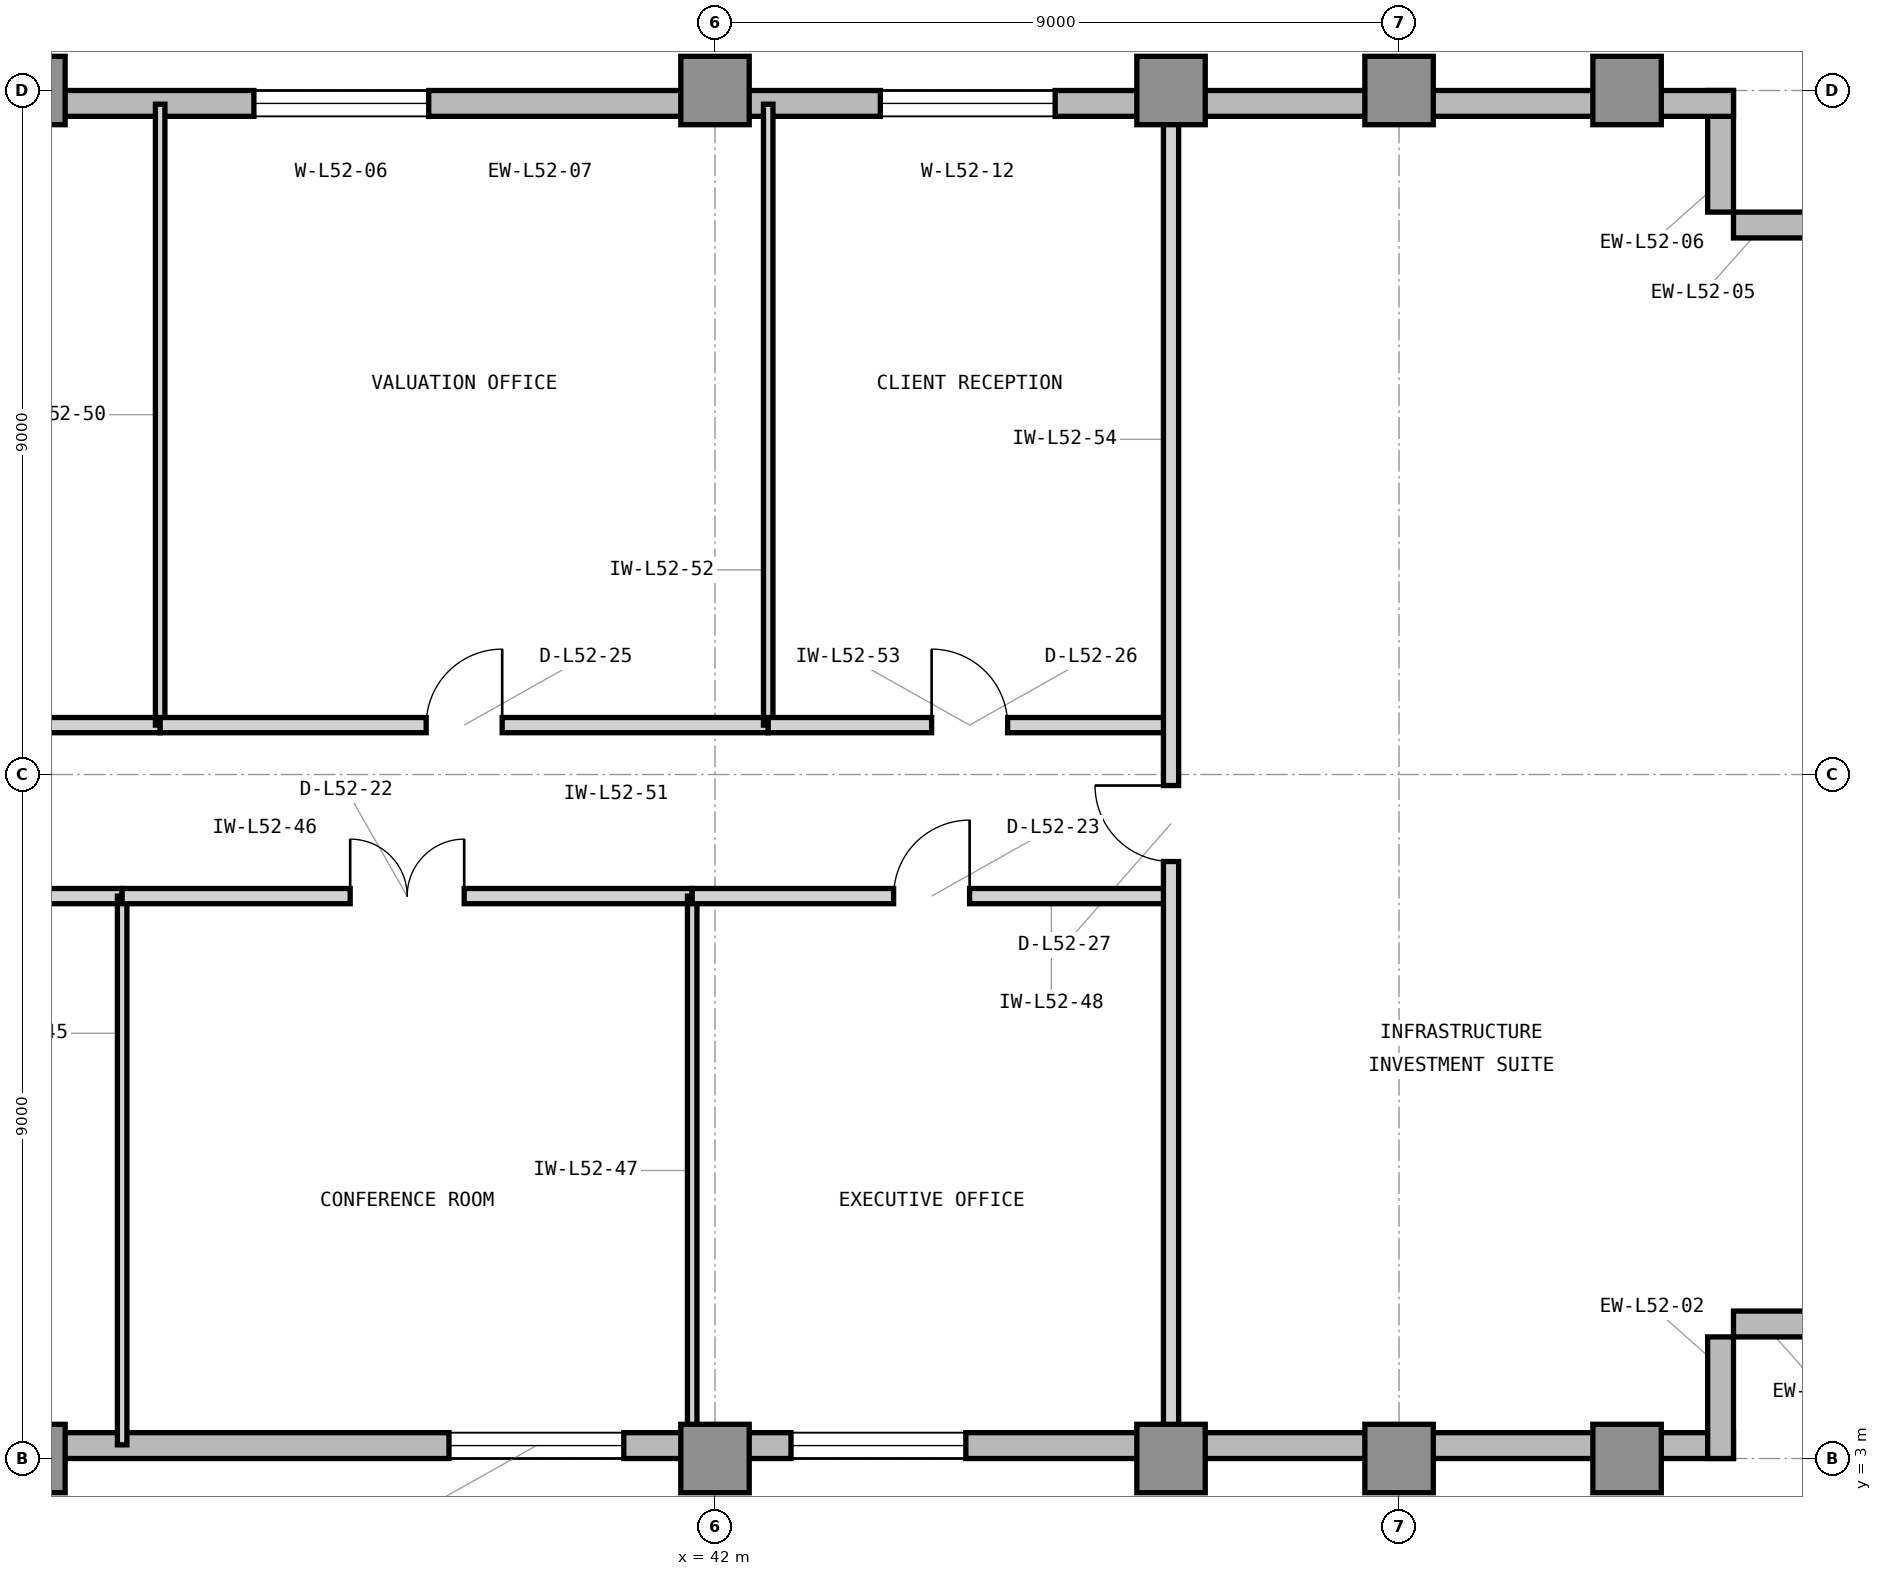
"""IFC4 building model, lengths in metres.
Left out: names, types, materials, properties, quantities, classifications, styles, units other than length and angle.
Written with IfcOpenShell. Run it as: python <this file> out.ifc"""

import sys

from ifc_helpers import new_model, si_unit, direction, frame, frame_2d, origin, origin_2d, place, context, subcontext, project, spatial, rectangle, extrude, element, fill, save


model = new_model("IFC4")
c1 = context("Model", 3, precision=1e-05, world=origin(), true_north=direction((0.0, 1.0)))
c2 = subcontext(c1, "Body", "Model", "MODEL_VIEW")
j1 = project(units=[si_unit("LENGTHUNIT", "METRE"), si_unit("PLANEANGLEUNIT", "RADIAN")], contexts=[c1])
p1 = place(None, origin())
s1 = spatial("IfcSite", under=j1, at=p1, CompositionType="ELEMENT")
p2 = place(p1, origin())
s2 = spatial("IfcBuilding", under=s1, at=p2, CompositionType="ELEMENT")
p3 = place(p2, frame((0.0, 0.0, 215.1)))
s3 = spatial("IfcBuildingStorey", under=s2, at=p3, CompositionType="ELEMENT", Elevation=215.1)
for number, where, z_axis, x_axis in (
    (1, (33.0, 3.0, 0.0), (0.0, 0.0, 1.0), (1.0, 0.0, 0.0)),
    (2, (33.0, 21.0, 0.0), (0.0, 0.0, 1.0), (1.0, 0.0, 0.0)),
    (3, (42.0, 3.0, 0.0), (0.0, 0.0, 1.0), (1.0, 0.0, 0.0)),
    (4, (42.0, 21.0, 0.0), (0.0, 0.0, 1.0), (1.0, 0.0, 0.0)),
    (5, (48.0, 3.0, 0.0), (0.0, 0.0, 1.0), (1.0, 0.0, 0.0)),
    (6, (48.0, 21.0, 0.0), (0.0, 0.0, 1.0), (1.0, 0.0, 0.0)),
    (7, (51.0, 3.0, 0.0), (0.0, 0.0, 1.0), (1.0, 0.0, 0.0)),
    (8, (51.0, 21.0, 0.0), (0.0, 0.0, 1.0), (1.0, 0.0, 0.0)),
    (9, (54.0, 3.0, 0.0), (0.0, 0.0, 1.0), (1.0, 0.0, 0.0)),
    (10, (54.0, 21.0, 0.0), (0.0, 0.0, 1.0), (1.0, 0.0, 0.0)),
):
    element("IfcColumn", number, at=place(p3, frame(where, z_axis=z_axis, x_axis=x_axis)), inside=s3, PredefinedType="COLUMN", context=c2, shape_type="SweptSolid", body=[
        extrude(rectangle(XDim=0.9, YDim=0.9, at=origin_2d()), origin(), (0.0, 0.0, 1.0), 3.9),
    ])
p4 = place(p3, frame((23.9, 3.17, 0.0), z_axis=(0.0, 0.0, 1.0), x_axis=(1.0, 0.0, 0.0)))
e11 = element("IfcWall", 11, at=p4, inside=s3, PredefinedType="STANDARD", context=c2, shape_type="SweptSolid", body=[
    extrude(rectangle(XDim=31.5, YDim=0.34, at=frame_2d((15.75, 0.0))), origin(), (0.0, 0.0, 1.0), 3.7),
])
p5 = place(p4, frame((5.6, 0.0, 0.9)))
e12 = element("IfcOpeningElement", 12, at=p5, cuts=e11, PredefinedType="OPENING", context=c2, shape_type="SweptSolid", body=[
    extrude(rectangle(XDim=2.3, YDim=2.2, at=frame_2d((1.15, 1.1))), frame((0.0, 0.18, 0.0), z_axis=(0.0, -1.0, 0.0), x_axis=(1.0, 0.0, 0.0)), (0.0, 0.0, 1.0), 0.36),
])
p6 = place(p4, frame((14.6, 0.0, 0.9)))
e13 = element("IfcOpeningElement", 13, at=p6, cuts=e11, PredefinedType="OPENING", context=c2, shape_type="SweptSolid", body=[
    extrude(rectangle(XDim=2.3, YDim=2.2, at=frame_2d((1.15, 1.1))), frame((0.0, 0.18, 0.0), z_axis=(0.0, -1.0, 0.0), x_axis=(1.0, 0.0, 0.0)), (0.0, 0.0, 1.0), 0.36),
])
p7 = place(p4, frame((19.1, 0.0, 0.9)))
e14 = element("IfcOpeningElement", 14, at=p7, cuts=e11, PredefinedType="OPENING", context=c2, shape_type="SweptSolid", body=[
    extrude(rectangle(XDim=2.3, YDim=2.2, at=frame_2d((1.15, 1.1))), frame((0.0, 0.18, 0.0), z_axis=(0.0, -1.0, 0.0), x_axis=(1.0, 0.0, 0.0)), (0.0, 0.0, 1.0), 0.36),
])
p8 = place(p4, frame((0.9, 0.0, 0.9)))
e15 = element("IfcOpeningElement", 15, at=p8, cuts=e11, PredefinedType="OPENING", context=c2, shape_type="SweptSolid", body=[
    extrude(rectangle(XDim=1.6, YDim=2.2, at=frame_2d((0.8, 1.1))), frame((0.0, 0.18, 0.0), z_axis=(0.0, -1.0, 0.0), x_axis=(1.0, 0.0, 0.0)), (0.0, 0.0, 1.0), 0.36),
])
for number, where, z_axis, x_axis in (
    (16, (55.23, 3.0, 0.0), (0.0, 0.0, 1.0), (0.0, 1.0, 0.0)),
    (17, (55.4, 4.77, 0.0), (0.0, 0.0, 1.0), (1.0, 0.0, 0.0)),
    (18, (57.0, 19.23, 0.0), (0.0, 0.0, 1.0), (-1.0, 0.0, 0.0)),
    (19, (55.23, 19.4, 0.0), (0.0, 0.0, 1.0), (0.0, 1.0, 0.0)),
):
    element("IfcWall", number, at=place(p3, frame(where, z_axis=z_axis, x_axis=x_axis)), inside=s3, PredefinedType="STANDARD", context=c2, shape_type="SweptSolid", body=[
        extrude(rectangle(XDim=1.6, YDim=0.34, at=frame_2d((0.8, 0.0))), origin(), (0.0, 0.0, 1.0), 3.7),
    ])
p9 = place(p3, frame((55.4, 20.83, 0.0), z_axis=(0.0, 0.0, 1.0), x_axis=(-1.0, 0.0, 0.0)))
e20 = element("IfcWall", 20, at=p9, inside=s3, PredefinedType="STANDARD", context=c2, shape_type="SweptSolid", body=[
    extrude(rectangle(XDim=31.4, YDim=0.34, at=frame_2d((15.7, 0.0))), origin(), (0.0, 0.0, 1.0), 3.7),
])
p10 = place(p9, frame((17.167, 0.0, 0.9)))
e21 = element("IfcOpeningElement", 21, at=p10, cuts=e20, PredefinedType="OPENING", context=c2, shape_type="SweptSolid", body=[
    extrude(rectangle(XDim=2.3, YDim=2.2, at=frame_2d((1.15, 1.1))), frame((0.0, 0.18, 0.0), z_axis=(0.0, -1.0, 0.0), x_axis=(1.0, 0.0, 0.0)), (0.0, 0.0, 1.0), 0.36),
])
p11 = place(p9, frame((29.046, 0.0, 0.9)))
e22 = element("IfcOpeningElement", 22, at=p11, cuts=e20, PredefinedType="OPENING", context=c2, shape_type="SweptSolid", body=[
    extrude(rectangle(XDim=1.6, YDim=2.2, at=frame_2d((0.8, 1.1))), frame((0.0, 0.18, 0.0), z_axis=(0.0, -1.0, 0.0), x_axis=(1.0, 0.0, 0.0)), (0.0, 0.0, 1.0), 0.36),
])
p12 = place(p9, frame((8.925, 0.0, 0.9)))
e23 = element("IfcOpeningElement", 23, at=p12, cuts=e20, PredefinedType="OPENING", context=c2, shape_type="SweptSolid", body=[
    extrude(rectangle(XDim=2.3, YDim=2.2, at=frame_2d((1.15, 1.1))), frame((0.0, 0.18, 0.0), z_axis=(0.0, -1.0, 0.0), x_axis=(1.0, 0.0, 0.0)), (0.0, 0.0, 1.0), 0.36),
])
p13 = place(p3, frame((26.7, 10.4, 0.0), z_axis=(0.0, 0.0, 1.0), x_axis=(1.0, 0.0, 0.0)))
e24 = element("IfcWall", 24, at=p13, inside=s3, PredefinedType="PARTITIONING", context=c2, shape_type="SweptSolid", body=[
    extrude(rectangle(XDim=7.5, YDim=0.2, at=frame_2d((3.75, 0.0))), origin(), (0.0, 0.0, 1.0), 3.69),
])
p14 = place(p13, frame((3.25, 0.0, 0.0)))
e25 = element("IfcOpeningElement", 25, at=p14, cuts=e24, PredefinedType="OPENING", context=c2, shape_type="SweptSolid", body=[
    extrude(rectangle(XDim=1.0, YDim=2.15, at=frame_2d((0.5, 1.075))), frame((0.0, 0.11, 0.0), z_axis=(0.0, -1.0, 0.0), x_axis=(1.0, 0.0, 0.0)), (0.0, 0.0, 1.0), 0.22),
])
p15 = place(p3, frame((34.2, 3.18, 0.0), z_axis=(0.0, 0.0, 1.0), x_axis=(0.0, 1.0, 0.0)))
e26 = element("IfcWall", 26, at=p15, inside=s3, PredefinedType="PARTITIONING", context=c2, shape_type="SweptSolid", body=[
    extrude(rectangle(XDim=7.22, YDim=0.125, at=frame_2d((3.61, 0.0))), origin(), (0.0, 0.0, 1.0), 3.69),
])
p16 = place(p3, frame((34.2, 10.4, 0.0), z_axis=(0.0, 0.0, 1.0), x_axis=(1.0, 0.0, 0.0)))
e27 = element("IfcWall", 27, at=p16, inside=s3, PredefinedType="PARTITIONING", context=c2, shape_type="SweptSolid", body=[
    extrude(rectangle(XDim=7.5, YDim=0.2, at=frame_2d((3.75, 0.0))), origin(), (0.0, 0.0, 1.0), 3.69),
])
p17 = place(p16, frame((3.0, 0.0, 0.0)))
e28 = element("IfcOpeningElement", 28, at=p17, cuts=e27, PredefinedType="OPENING", context=c2, shape_type="SweptSolid", body=[
    extrude(rectangle(XDim=1.5, YDim=2.3, at=frame_2d((0.75, 1.15))), frame((0.0, 0.11, 0.0), z_axis=(0.0, -1.0, 0.0), x_axis=(1.0, 0.0, 0.0)), (0.0, 0.0, 1.0), 0.22),
])
p18 = place(p3, frame((41.7, 3.18, 0.0), z_axis=(0.0, 0.0, 1.0), x_axis=(0.0, 1.0, 0.0)))
e29 = element("IfcWall", 29, at=p18, inside=s3, PredefinedType="PARTITIONING", context=c2, shape_type="SweptSolid", body=[
    extrude(rectangle(XDim=7.22, YDim=0.125, at=frame_2d((3.61, 0.0))), origin(), (0.0, 0.0, 1.0), 3.69),
])
p19 = place(p3, frame((41.7, 10.4, 0.0), z_axis=(0.0, 0.0, 1.0), x_axis=(1.0, 0.0, 0.0)))
e30 = element("IfcWall", 30, at=p19, inside=s3, PredefinedType="PARTITIONING", context=c2, shape_type="SweptSolid", body=[
    extrude(rectangle(XDim=6.3, YDim=0.2, at=frame_2d((3.15, 0.0))), origin(), (0.0, 0.0, 1.0), 3.69),
])
p20 = place(p19, frame((2.65, 0.0, 0.0)))
e31 = element("IfcOpeningElement", 31, at=p20, cuts=e30, PredefinedType="OPENING", context=c2, shape_type="SweptSolid", body=[
    extrude(rectangle(XDim=1.0, YDim=2.15, at=frame_2d((0.5, 1.075))), frame((0.0, 0.11, 0.0), z_axis=(0.0, -1.0, 0.0), x_axis=(1.0, 0.0, 0.0)), (0.0, 0.0, 1.0), 0.22),
])
p21 = place(p3, frame((26.7, 12.65, 0.0), z_axis=(0.0, 0.0, 1.0), x_axis=(1.0, 0.0, 0.0)))
e32 = element("IfcWall", 32, at=p21, inside=s3, PredefinedType="PARTITIONING", context=c2, shape_type="SweptSolid", body=[
    extrude(rectangle(XDim=8.0, YDim=0.2, at=frame_2d((4.0, 0.0))), origin(), (0.0, 0.0, 1.0), 3.69),
])
p22 = place(p21, frame((3.5, 0.0, 0.0)))
e33 = element("IfcOpeningElement", 33, at=p22, cuts=e32, PredefinedType="OPENING", context=c2, shape_type="SweptSolid", body=[
    extrude(rectangle(XDim=1.0, YDim=2.15, at=frame_2d((0.5, 1.075))), frame((0.0, 0.11, 0.0), z_axis=(0.0, -1.0, 0.0), x_axis=(1.0, 0.0, 0.0)), (0.0, 0.0, 1.0), 0.22),
])
p23 = place(p3, frame((34.7, 12.65, 0.0), z_axis=(0.0, 0.0, 1.0), x_axis=(0.0, 1.0, 0.0)))
e34 = element("IfcWall", 34, at=p23, inside=s3, PredefinedType="PARTITIONING", context=c2, shape_type="SweptSolid", body=[
    extrude(rectangle(XDim=8.17, YDim=0.125, at=frame_2d((4.085, 0.0))), origin(), (0.0, 0.0, 1.0), 3.69),
])
p24 = place(p3, frame((34.7, 12.65, 0.0), z_axis=(0.0, 0.0, 1.0), x_axis=(1.0, 0.0, 0.0)))
e35 = element("IfcWall", 35, at=p24, inside=s3, PredefinedType="PARTITIONING", context=c2, shape_type="SweptSolid", body=[
    extrude(rectangle(XDim=8.0, YDim=0.2, at=frame_2d((4.0, 0.0))), origin(), (0.0, 0.0, 1.0), 3.69),
])
p25 = place(p24, frame((3.5, 0.0, 0.0)))
e36 = element("IfcOpeningElement", 36, at=p25, cuts=e35, PredefinedType="OPENING", context=c2, shape_type="SweptSolid", body=[
    extrude(rectangle(XDim=1.0, YDim=2.15, at=frame_2d((0.5, 1.075))), frame((0.0, 0.11, 0.0), z_axis=(0.0, -1.0, 0.0), x_axis=(1.0, 0.0, 0.0)), (0.0, 0.0, 1.0), 0.22),
])
p26 = place(p3, frame((42.7, 12.65, 0.0), z_axis=(0.0, 0.0, 1.0), x_axis=(0.0, 1.0, 0.0)))
e37 = element("IfcWall", 37, at=p26, inside=s3, PredefinedType="PARTITIONING", context=c2, shape_type="SweptSolid", body=[
    extrude(rectangle(XDim=8.17, YDim=0.125, at=frame_2d((4.085, 0.0))), origin(), (0.0, 0.0, 1.0), 3.69),
])
p27 = place(p3, frame((42.7, 12.65, 0.0), z_axis=(0.0, 0.0, 1.0), x_axis=(1.0, 0.0, 0.0)))
e38 = element("IfcWall", 38, at=p27, inside=s3, PredefinedType="PARTITIONING", context=c2, shape_type="SweptSolid", body=[
    extrude(rectangle(XDim=5.3, YDim=0.2, at=frame_2d((2.65, 0.0))), origin(), (0.0, 0.0, 1.0), 3.69),
])
p28 = place(p27, frame((2.15, 0.0, 0.0)))
e39 = element("IfcOpeningElement", 39, at=p28, cuts=e38, PredefinedType="OPENING", context=c2, shape_type="SweptSolid", body=[
    extrude(rectangle(XDim=1.0, YDim=2.15, at=frame_2d((0.5, 1.075))), frame((0.0, 0.11, 0.0), z_axis=(0.0, -1.0, 0.0), x_axis=(1.0, 0.0, 0.0)), (0.0, 0.0, 1.0), 0.22),
])
p29 = place(p3, frame((48.0, 3.18, 0.0), z_axis=(0.0, 0.0, 1.0), x_axis=(0.0, 1.0, 0.0)))
e40 = element("IfcWall", 40, at=p29, inside=s3, PredefinedType="PARTITIONING", context=c2, shape_type="SweptSolid", body=[
    extrude(rectangle(XDim=17.64, YDim=0.2, at=frame_2d((8.82, 0.0))), origin(), (0.0, 0.0, 1.0), 3.073),
])
p30 = place(p29, frame((7.675, 0.0, 0.0)))
e41 = element("IfcOpeningElement", 41, at=p30, cuts=e40, PredefinedType="OPENING", context=c2, shape_type="SweptSolid", body=[
    extrude(rectangle(XDim=1.0, YDim=2.15, at=frame_2d((0.5, 1.075))), frame((0.0, 0.11, 0.0), z_axis=(0.0, -1.0, 0.0), x_axis=(1.0, 0.0, 0.0)), (0.0, 0.0, 1.0), 0.22),
])
p31 = place(p6, origin())
e42 = element("IfcWindow", 42, at=p31, inside=s3, PartitioningType="SINGLE_PANEL", PredefinedType="WINDOW", context=c2, shape_type="SweptSolid", body=[
    extrude(rectangle(XDim=2.3, YDim=2.2, at=frame_2d((1.15, 1.1))), frame((0.0, 0.11, 0.0), z_axis=(0.0, -1.0, 0.0), x_axis=(1.0, 0.0, 0.0)), (0.0, 0.0, 1.0), 0.06),
])
fill(e13, e42)
p32 = place(p7, origin())
e43 = element("IfcWindow", 43, at=p32, inside=s3, PartitioningType="SINGLE_PANEL", PredefinedType="WINDOW", context=c2, shape_type="SweptSolid", body=[
    extrude(rectangle(XDim=2.3, YDim=2.2, at=frame_2d((1.15, 1.1))), frame((0.0, 0.11, 0.0), z_axis=(0.0, -1.0, 0.0), x_axis=(1.0, 0.0, 0.0)), (0.0, 0.0, 1.0), 0.06),
])
fill(e14, e43)
p33 = place(p10, origin())
e44 = element("IfcWindow", 44, at=p33, inside=s3, PartitioningType="SINGLE_PANEL", PredefinedType="WINDOW", context=c2, shape_type="SweptSolid", body=[
    extrude(rectangle(XDim=2.3, YDim=2.2, at=frame_2d((1.15, 1.1))), frame((0.0, 0.11, 0.0), z_axis=(0.0, -1.0, 0.0), x_axis=(1.0, 0.0, 0.0)), (0.0, 0.0, 1.0), 0.06),
])
fill(e21, e44)
p34 = place(p17, origin())
e45 = element("IfcDoor", 45, at=p34, inside=s3, OperationType="DOUBLE_DOOR_SINGLE_SWING", PredefinedType="DOOR", context=c2, shape_type="SweptSolid", body=[
    extrude(rectangle(XDim=1.5, YDim=2.3, at=frame_2d((0.75, 1.15))), frame((0.0, 0.025, 0.0), z_axis=(0.0, -1.0, 0.0), x_axis=(1.0, 0.0, 0.0)), (0.0, 0.0, 1.0), 0.05),
])
fill(e28, e45)
p35 = place(p20, origin())
e46 = element("IfcDoor", 46, at=p35, inside=s3, OperationType="SINGLE_SWING_RIGHT", PredefinedType="DOOR", context=c2, shape_type="SweptSolid", body=[
    extrude(rectangle(XDim=1.0, YDim=2.15, at=frame_2d((0.5, 1.075))), frame((0.0, 0.025, 0.0), z_axis=(0.0, -1.0, 0.0), x_axis=(1.0, 0.0, 0.0)), (0.0, 0.0, 1.0), 0.05),
])
fill(e31, e46)
p36 = place(p25, origin())
e47 = element("IfcDoor", 47, at=p36, inside=s3, OperationType="SINGLE_SWING_RIGHT", PredefinedType="DOOR", context=c2, shape_type="SweptSolid", body=[
    extrude(rectangle(XDim=1.0, YDim=2.15, at=frame_2d((0.5, 1.075))), frame((0.0, 0.025, 0.0), z_axis=(0.0, -1.0, 0.0), x_axis=(1.0, 0.0, 0.0)), (0.0, 0.0, 1.0), 0.05),
])
fill(e36, e47)
p37 = place(p28, origin())
e48 = element("IfcDoor", 48, at=p37, inside=s3, OperationType="SINGLE_SWING_LEFT", PredefinedType="DOOR", context=c2, shape_type="SweptSolid", body=[
    extrude(rectangle(XDim=1.0, YDim=2.15, at=frame_2d((0.5, 1.075))), frame((0.0, 0.025, 0.0), z_axis=(0.0, -1.0, 0.0), x_axis=(1.0, 0.0, 0.0)), (0.0, 0.0, 1.0), 0.05),
])
fill(e39, e48)
p38 = place(p30, origin())
e49 = element("IfcDoor", 49, at=p38, inside=s3, OperationType="SINGLE_SWING_RIGHT", PredefinedType="DOOR", context=c2, shape_type="SweptSolid", body=[
    extrude(rectangle(XDim=1.0, YDim=2.15, at=frame_2d((0.5, 1.075))), frame((0.0, 0.025, 0.0), z_axis=(0.0, -1.0, 0.0), x_axis=(1.0, 0.0, 0.0)), (0.0, 0.0, 1.0), 0.05),
])
fill(e41, e49)
p39 = place(p12, origin())
e50 = element("IfcWindow", 50, at=p39, inside=s3, PartitioningType="SINGLE_PANEL", PredefinedType="WINDOW", context=c2, shape_type="SweptSolid", body=[
    extrude(rectangle(XDim=2.3, YDim=2.2, at=frame_2d((1.15, 1.1))), frame((0.0, 0.11, 0.0), z_axis=(0.0, -1.0, 0.0), x_axis=(1.0, 0.0, 0.0)), (0.0, 0.0, 1.0), 0.06),
])
fill(e23, e50)
save(model, sys.argv[1])
